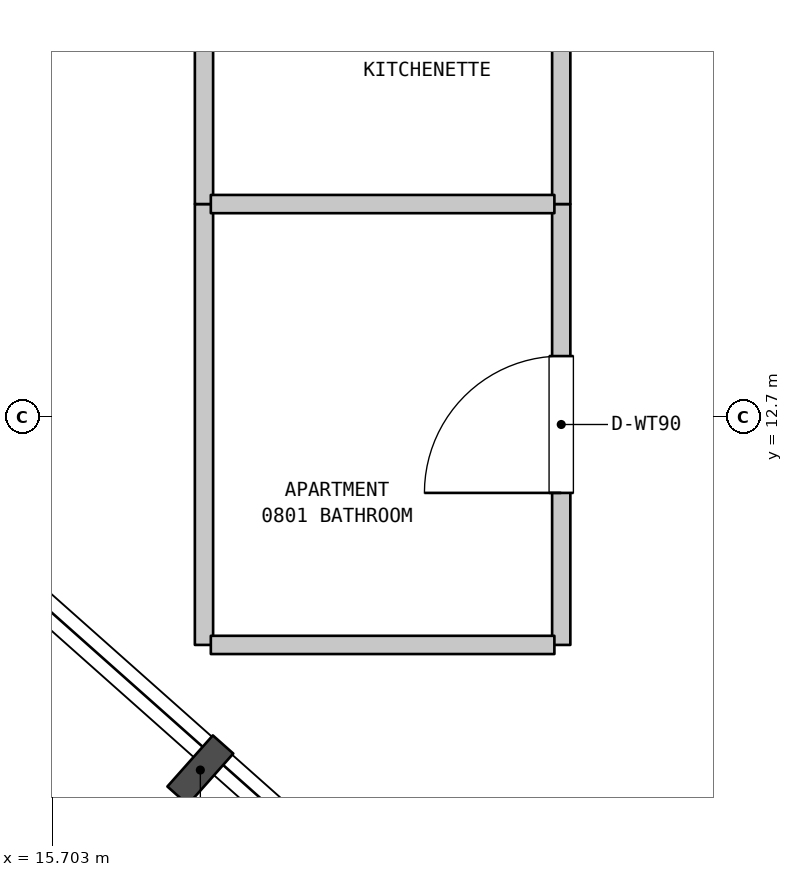
"""IFC4 building model, lengths in metres.
Left out: names, types, materials, properties, quantities, classifications, styles, units other than length and angle.
Written with IfcOpenShell. Run it as: python <this file> out.ifc"""

import sys

from ifc_helpers import new_model, si_unit, direction, frame, frame_2d, origin, place, context, subcontext, project, spatial, rectangle, extrude, element, fill, save


model = new_model("IFC4")
c1 = context("Model", 3, precision=1e-05, world=origin(), true_north=direction((0.0, 1.0)))
c2 = subcontext(c1, "Body", "Model", "MODEL_VIEW")
j1 = project(units=[si_unit("LENGTHUNIT", "METRE"), si_unit("PLANEANGLEUNIT", "RADIAN")], contexts=[c1])
p1 = place(None, origin())
s1 = spatial("IfcSite", under=j1, at=p1, CompositionType="ELEMENT")
p2 = place(p1, origin())
s2 = spatial("IfcBuilding", under=s1, at=p2, CompositionType="ELEMENT")
p3 = place(p2, frame((0.0, 0.0, 38.8)))
s3 = spatial("IfcBuildingStorey", under=s2, at=p3, CompositionType="ELEMENT", Elevation=38.8)
p4 = place(p3, frame((16.7, 11.2, 0.0), z_axis=(0.0, 0.0, 1.0), x_axis=(0.0, 1.0, 0.0)))
e1 = element("IfcWall", 1, at=p4, inside=s3, PredefinedType="PARTITIONING", context=c2, shape_type="SweptSolid", body=[
    extrude(rectangle(XDim=2.9, YDim=0.12, at=frame_2d((1.45, 0.0))), origin(), (0.0, 0.0, 1.0), 3.385),
])
p5 = place(p3, frame((16.7, 14.1, 0.0), z_axis=(0.0, 0.0, 1.0), x_axis=(0.0, 1.0, 0.0)))
e2 = element("IfcWall", 2, at=p5, inside=s3, PredefinedType="PARTITIONING", context=c2, shape_type="SweptSolid", body=[
    extrude(rectangle(XDim=3.2, YDim=0.12, at=frame_2d((1.6, 0.0))), origin(), (0.0, 0.0, 1.0), 3.385),
])
p6 = place(p5, frame((1.15, 0.0, 0.0)))
e3 = element("IfcOpeningElement", 3, at=p6, cuts=e2, PredefinedType="OPENING", context=c2, shape_type="SweptSolid", body=[
    extrude(rectangle(XDim=0.9, YDim=2.15, at=frame_2d((0.45, 1.075))), frame((0.0, 0.07, 0.0), z_axis=(0.0, -1.0, 0.0), x_axis=(1.0, 0.0, 0.0)), (0.0, 0.0, 1.0), 0.14),
])
p7 = place(p3, frame((19.05, 11.2, 0.0), z_axis=(0.0, 0.0, 1.0), x_axis=(0.0, 1.0, 0.0)))
e4 = element("IfcWall", 4, at=p7, inside=s3, PredefinedType="PARTITIONING", context=c2, shape_type="SweptSolid", body=[
    extrude(rectangle(XDim=2.9, YDim=0.12, at=frame_2d((1.45, 0.0))), origin(), (0.0, 0.0, 1.0), 3.385),
])
p8 = place(p7, frame((1.0, 0.0, 0.0)))
e5 = element("IfcOpeningElement", 5, at=p8, cuts=e4, PredefinedType="OPENING", context=c2, shape_type="SweptSolid", body=[
    extrude(rectangle(XDim=0.9, YDim=2.1, at=frame_2d((0.45, 1.05))), frame((0.0, 0.07, 0.0), z_axis=(0.0, -1.0, 0.0), x_axis=(1.0, 0.0, 0.0)), (0.0, 0.0, 1.0), 0.14),
])
p9 = place(p3, frame((19.05, 14.1, 0.0), z_axis=(0.0, 0.0, 1.0), x_axis=(0.0, 1.0, 0.0)))
e6 = element("IfcWall", 6, at=p9, inside=s3, PredefinedType="PARTITIONING", context=c2, shape_type="SweptSolid", body=[
    extrude(rectangle(XDim=3.2, YDim=0.12, at=frame_2d((1.6, 0.0))), origin(), (0.0, 0.0, 1.0), 3.385),
])
for number, where, z_axis, x_axis in (
    (7, (16.745, 11.2, 0.0), (0.0, 0.0, 1.0), (1.0, 0.0, 0.0)),
    (8, (16.745, 14.1, 0.0), (0.0, 0.0, 1.0), (1.0, 0.0, 0.0)),
):
    element("IfcWall", number, at=place(p3, frame(where, z_axis=z_axis, x_axis=x_axis)), inside=s3, PredefinedType="PARTITIONING", context=c2, shape_type="SweptSolid", body=[
        extrude(rectangle(XDim=2.26, YDim=0.12, at=frame_2d((1.13, 0.0))), origin(), (0.0, 0.0, 1.0), 3.385),
    ])
p10 = place(p8, origin())
e9 = element("IfcDoor", 9, at=p10, inside=s3, OperationType="SINGLE_SWING_LEFT", PredefinedType="DOOR", context=c2, shape_type="SweptSolid", body=[
    extrude(rectangle(XDim=0.9, YDim=2.1, at=frame_2d((0.45, 1.05))), frame((0.0, 0.025, 0.0), z_axis=(0.0, -1.0, 0.0), x_axis=(1.0, 0.0, 0.0)), (0.0, 0.0, 1.0), 0.05),
])
fill(e5, e9)
save(model, sys.argv[1])
